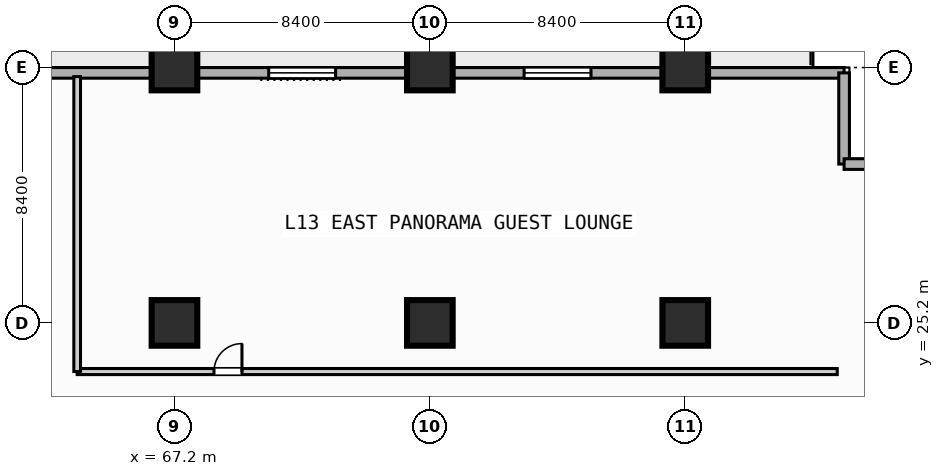
"""IFC4 building model, lengths in metres.
Left out: names, types, materials, properties, quantities, classifications, styles, units other than length and angle.
Written with IfcOpenShell. Run it as: python <this file> out.ifc"""

import sys

from ifc_helpers import new_model, si_unit, direction, frame, frame_2d, origin, origin_2d, place, context, subcontext, project, spatial, rectangle, extrude, element, fill, save


model = new_model("IFC4")
c1 = context("Model", 3, precision=1e-05, world=origin(), true_north=direction((0.0, 1.0)))
c2 = subcontext(c1, "Body", "Model", "MODEL_VIEW")
j1 = project(units=[si_unit("LENGTHUNIT", "METRE"), si_unit("PLANEANGLEUNIT", "RADIAN")], contexts=[c1])
p1 = place(None, origin())
s1 = spatial("IfcSite", under=j1, at=p1, CompositionType="ELEMENT")
p2 = place(p1, origin())
s2 = spatial("IfcBuilding", under=s1, at=p2, CompositionType="ELEMENT")
p3 = place(p2, frame((0.0, 0.0, 58.6)))
s3 = spatial("IfcBuildingStorey", under=s2, at=p3, CompositionType="ELEMENT", Elevation=58.6)
for number, where, z_axis, x_axis in (
    (1, (67.2, 25.2, 0.0), (0.0, 0.0, 1.0), (1.0, 0.0, 0.0)),
    (2, (67.2, 33.6, 0.0), (0.0, 0.0, 1.0), (1.0, 0.0, 0.0)),
    (3, (75.6, 25.2, 0.0), (0.0, 0.0, 1.0), (1.0, 0.0, 0.0)),
    (4, (75.6, 33.6, 0.0), (0.0, 0.0, 1.0), (1.0, 0.0, 0.0)),
    (5, (84.0, 25.2, 0.0), (0.0, 0.0, 1.0), (1.0, 0.0, 0.0)),
    (6, (84.0, 33.6, 0.0), (0.0, 0.0, 1.0), (1.0, 0.0, 0.0)),
):
    element("IfcColumn", number, at=place(p3, frame(where, z_axis=z_axis, x_axis=x_axis)), inside=s3, PredefinedType="COLUMN", context=c2, shape_type="SweptSolid", body=[
        extrude(rectangle(XDim=1.5, YDim=1.5, at=origin_2d()), origin(), (0.0, 0.0, 1.0), 3.8),
    ])
p4 = place(p3, frame((33.425, 33.425, 0.0), z_axis=(0.0, 0.0, 1.0), x_axis=(1.0, 0.0, 0.0)))
e7 = element("IfcWall", 7, at=p4, inside=s3, PredefinedType="STANDARD", context=c2, shape_type="SweptSolid", body=[
    extrude(rectangle(XDim=55.8, YDim=0.35, at=frame_2d((27.9, 0.0))), origin(), (0.0, 0.0, 1.0), 3.55),
])
p5 = place(p4, frame((12.075, 0.0, 0.0)))
e8 = element("IfcOpeningElement", 8, at=p5, cuts=e7, PredefinedType="OPENING", context=c2, shape_type="SweptSolid", body=[
    extrude(rectangle(XDim=1.4, YDim=2.2, at=frame_2d((0.7, 1.1))), frame((0.0, 0.185, 0.0), z_axis=(0.0, -1.0, 0.0), x_axis=(1.0, 0.0, 0.0)), (0.0, 0.0, 1.0), 0.37),
])
p6 = place(p4, frame((36.875, 0.0, 0.85)))
e9 = element("IfcOpeningElement", 9, at=p6, cuts=e7, PredefinedType="OPENING", context=c2, shape_type="SweptSolid", body=[
    extrude(rectangle(XDim=2.2, YDim=1.8, at=frame_2d((1.1, 0.9))), frame((0.0, 0.185, 0.0), z_axis=(0.0, -1.0, 0.0), x_axis=(1.0, 0.0, 0.0)), (0.0, 0.0, 1.0), 0.37),
])
p7 = place(p4, frame((45.275, 0.0, 0.85)))
e10 = element("IfcOpeningElement", 10, at=p7, cuts=e7, PredefinedType="OPENING", context=c2, shape_type="SweptSolid", body=[
    extrude(rectangle(XDim=2.2, YDim=1.8, at=frame_2d((1.1, 0.9))), frame((0.0, 0.185, 0.0), z_axis=(0.0, -1.0, 0.0), x_axis=(1.0, 0.0, 0.0)), (0.0, 0.0, 1.0), 0.37),
])
for number, where, z_axis, x_axis in (
    (11, (89.225, 33.425, 0.0), (0.0, 0.0, 1.0), (0.0, -1.0, 0.0)),
    (12, (89.225, 30.425, 0.0), (0.0, 0.0, 1.0), (1.0, 0.0, 0.0)),
):
    element("IfcWall", number, at=place(p3, frame(where, z_axis=z_axis, x_axis=x_axis)), inside=s3, PredefinedType="STANDARD", context=c2, shape_type="SweptSolid", body=[
        extrude(rectangle(XDim=3.0, YDim=0.35, at=frame_2d((1.5, 0.0))), origin(), (0.0, 0.0, 1.0), 3.55),
    ])
p8 = place(p3, frame((64.0, 23.6, 0.0), z_axis=(0.0, 0.0, 1.0), x_axis=(1.0, 0.0, 0.0)))
e13 = element("IfcWall", 13, at=p8, inside=s3, PredefinedType="PARTITIONING", context=c2, shape_type="SweptSolid", body=[
    extrude(rectangle(XDim=25.0, YDim=0.2, at=frame_2d((12.5, 0.0))), origin(), (0.0, 0.0, 1.0), 3.55),
])
p9 = place(p8, frame((4.5, 0.0, 0.0)))
e14 = element("IfcOpeningElement", 14, at=p9, cuts=e13, PredefinedType="OPENING", context=c2, shape_type="SweptSolid", body=[
    extrude(rectangle(XDim=0.92, YDim=2.1, at=frame_2d((0.46, 1.05))), frame((0.0, 0.11, 0.0), z_axis=(0.0, -1.0, 0.0), x_axis=(1.0, 0.0, 0.0)), (0.0, 0.0, 1.0), 0.22),
])
p10 = place(p3, frame((64.0, 23.6, 0.0), z_axis=(0.0, 0.0, 1.0), x_axis=(0.0, 1.0, 0.0)))
e15 = element("IfcWall", 15, at=p10, inside=s3, PredefinedType="PARTITIONING", context=c2, shape_type="SweptSolid", body=[
    extrude(rectangle(XDim=9.7, YDim=0.22, at=frame_2d((4.85, 0.0))), origin(), (0.0, 0.0, 1.0), 3.55),
])
p11 = place(p6, origin())
e16 = element("IfcWindow", 16, at=p11, inside=s3, PartitioningType="SINGLE_PANEL", PredefinedType="WINDOW", context=c2, shape_type="SweptSolid", body=[
    extrude(rectangle(XDim=2.2, YDim=1.8, at=frame_2d((1.1, 0.9))), frame((0.0, 0.03, 0.0), z_axis=(0.0, -1.0, 0.0), x_axis=(1.0, 0.0, 0.0)), (0.0, 0.0, 1.0), 0.06),
])
fill(e9, e16)
p12 = place(p7, origin())
e17 = element("IfcWindow", 17, at=p12, inside=s3, PartitioningType="SINGLE_PANEL", PredefinedType="WINDOW", context=c2, shape_type="SweptSolid", body=[
    extrude(rectangle(XDim=2.2, YDim=1.8, at=frame_2d((1.1, 0.9))), frame((0.0, 0.03, 0.0), z_axis=(0.0, -1.0, 0.0), x_axis=(1.0, 0.0, 0.0)), (0.0, 0.0, 1.0), 0.06),
])
fill(e10, e17)
p13 = place(p9, origin())
e18 = element("IfcDoor", 18, at=p13, inside=s3, OperationType="SINGLE_SWING_RIGHT", PredefinedType="DOOR", context=c2, shape_type="SweptSolid", body=[
    extrude(rectangle(XDim=0.92, YDim=2.1, at=frame_2d((0.46, 1.05))), frame((0.0, 0.025, 0.0), z_axis=(0.0, -1.0, 0.0), x_axis=(1.0, 0.0, 0.0)), (0.0, 0.0, 1.0), 0.05),
])
fill(e14, e18)
save(model, sys.argv[1])
